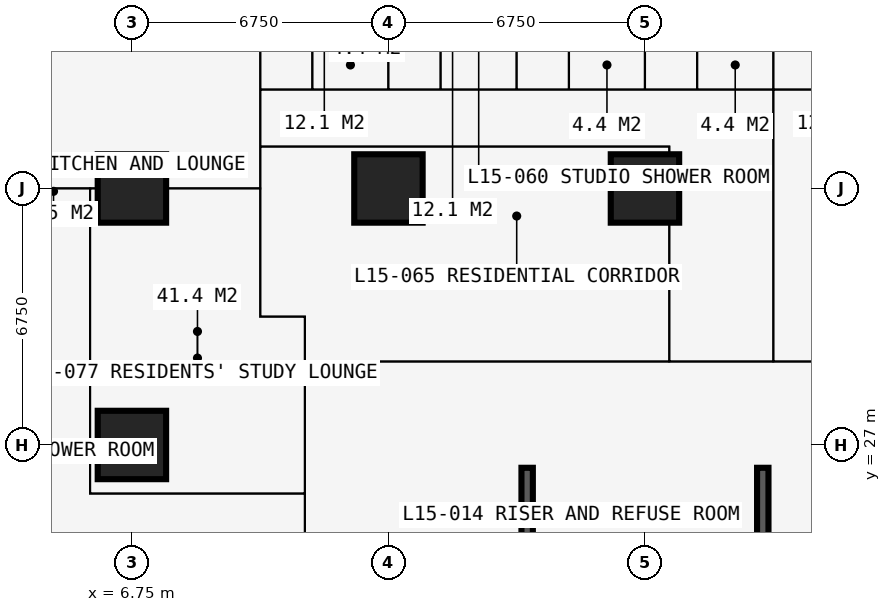
"""IFC4 building model, lengths in metres.
Left out: names, types, materials, properties, quantities, classifications, styles, units other than length and angle.
Written with IfcOpenShell. Run it as: python <this file> out.ifc"""

import sys

from ifc_helpers import new_model, si_unit, direction, frame, frame_2d, origin, origin_2d, place, context, subcontext, project, spatial, rectangle, extrude, element, fill, save


model = new_model("IFC4")
c1 = context("Model", 3, precision=1e-05, world=origin(), true_north=direction((0.0, 1.0)))
c2 = subcontext(c1, "Body", "Model", "MODEL_VIEW")
j1 = project(units=[si_unit("LENGTHUNIT", "METRE"), si_unit("PLANEANGLEUNIT", "RADIAN")], contexts=[c1])
p1 = place(None, origin())
s1 = spatial("IfcSite", under=j1, at=p1, CompositionType="ELEMENT")
p2 = place(p1, origin())
s2 = spatial("IfcBuilding", under=s1, at=p2, CompositionType="ELEMENT")
p3 = place(p2, frame((0.0, 0.0, 57.6)))
s3 = spatial("IfcBuildingStorey", under=s2, at=p3, CompositionType="ELEMENT", Elevation=57.6)
for number, where, z_axis, x_axis in (
    (1, (6.75, 27.0, 0.0), (0.0, 0.0, 1.0), (1.0, 0.0, 0.0)),
    (2, (6.75, 33.75, 0.0), (0.0, 0.0, 1.0), (1.0, 0.0, 0.0)),
    (3, (13.5, 33.75, 0.0), (0.0, 0.0, 1.0), (1.0, 0.0, 0.0)),
    (4, (20.25, 33.75, 0.0), (0.0, 0.0, 1.0), (1.0, 0.0, 0.0)),
):
    element("IfcColumn", number, at=place(p3, frame(where, z_axis=z_axis, x_axis=x_axis)), inside=s3, PredefinedType="COLUMN", context=c2, shape_type="SweptSolid", body=[
        extrude(rectangle(XDim=1.8, YDim=1.8, at=origin_2d()), origin(), (0.0, 0.0, 1.0), 3.6),
    ])
p4 = place(p3, frame((27.6, 27.0, 0.0), z_axis=(0.0, 0.0, 1.0), x_axis=(-1.0, 0.0, 0.0)))
e5 = element("IfcWall", 5, at=p4, inside=s3, PredefinedType="SHEAR", context=c2, shape_type="SweptSolid", body=[
    extrude(rectangle(XDim=14.7, YDim=1.2, at=frame_2d((7.35, 0.0))), origin(), (0.0, 0.0, 1.0), 3.6),
])
p5 = place(p4, frame((5.225, 0.0, 0.0)))
e6 = element("IfcOpeningElement", 6, at=p5, cuts=e5, PredefinedType="OPENING", context=c2, shape_type="SweptSolid", body=[
    extrude(rectangle(XDim=0.9, YDim=2.2, at=frame_2d((0.45, 1.1))), frame((0.0, 0.61, 0.0), z_axis=(0.0, -1.0, 0.0), x_axis=(1.0, 0.0, 0.0)), (0.0, 0.0, 1.0), 1.22),
])
p6 = place(p4, frame((8.2, 0.0, 0.0)))
e7 = element("IfcOpeningElement", 7, at=p6, cuts=e5, PredefinedType="OPENING", context=c2, shape_type="SweptSolid", body=[
    extrude(rectangle(XDim=1.0, YDim=2.2, at=frame_2d((0.5, 1.1))), frame((0.0, 0.61, 0.0), z_axis=(0.0, -1.0, 0.0), x_axis=(1.0, 0.0, 0.0)), (0.0, 0.0, 1.0), 1.22),
])
p7 = place(p3, frame((13.5, 26.4, 0.0), z_axis=(0.0, 0.0, 1.0), x_axis=(0.0, -1.0, 0.0)))
e8 = element("IfcWall", 8, at=p7, inside=s3, PredefinedType="SHEAR", context=c2, shape_type="SweptSolid", body=[
    extrude(rectangle(XDim=12.3, YDim=1.2, at=frame_2d((6.15, 0.0))), origin(), (0.0, 0.0, 1.0), 3.6),
])
p8 = place(p7, frame((7.45, 0.0, 0.0)))
e9 = element("IfcOpeningElement", 9, at=p8, cuts=e8, PredefinedType="OPENING", context=c2, shape_type="SweptSolid", body=[
    extrude(rectangle(XDim=1.2, YDim=2.2, at=frame_2d((0.6, 1.1))), frame((0.0, 0.61, 0.0), z_axis=(0.0, -1.0, 0.0), x_axis=(1.0, 0.0, 0.0)), (0.0, 0.0, 1.0), 1.22),
])
for number, where, z_axis, x_axis in (
    (10, (17.15, 20.3, 0.0), (0.0, 0.0, 1.0), (0.0, 1.0, 0.0)),
    (11, (23.35, 20.3, 0.0), (0.0, 0.0, 1.0), (0.0, 1.0, 0.0)),
):
    element("IfcWall", number, at=place(p3, frame(where, z_axis=z_axis, x_axis=x_axis)), inside=s3, PredefinedType="SHEAR", context=c2, shape_type="SweptSolid", body=[
        extrude(rectangle(XDim=6.1, YDim=0.3, at=frame_2d((3.05, 0.0))), origin(), (0.0, 0.0, 1.0), 3.6),
    ])
p9 = place(p3, frame((19.375, 23.4, 0.0), z_axis=(0.0, 0.0, 1.0), x_axis=(0.0, 1.0, 0.0)))
e12 = element("IfcWall", 12, at=p9, inside=s3, PredefinedType="PARTITIONING", context=c2, shape_type="SweptSolid", body=[
    extrude(rectangle(XDim=3.0, YDim=0.15, at=frame_2d((1.5, 0.0))), origin(), (0.0, 0.0, 1.0), 3.375),
])
p10 = place(p3, frame((4.15, 33.75, 0.0), z_axis=(0.0, 0.0, 1.0), x_axis=(1.0, 0.0, 0.0)))
e13 = element("IfcWall", 13, at=p10, inside=s3, PredefinedType="PARTITIONING", context=c2, shape_type="SweptSolid", body=[
    extrude(rectangle(XDim=5.975, YDim=0.15, at=frame_2d((2.988, 0.0))), origin(), (0.0, 0.0, 1.0), 2.877),
])
p11 = place(p3, frame((5.65, 25.725, 0.0), z_axis=(0.0, 0.0, 1.0), x_axis=(0.0, 1.0, 0.0)))
e14 = element("IfcWall", 14, at=p11, inside=s3, PredefinedType="PARTITIONING", context=c2, shape_type="SweptSolid", body=[
    extrude(rectangle(XDim=8.025, YDim=0.15, at=frame_2d((4.012, 0.0))), origin(), (0.0, 0.0, 1.0), 3.375),
])
p12 = place(p3, frame((5.65, 25.725, 0.0), z_axis=(0.0, 0.0, 1.0), x_axis=(1.0, 0.0, 0.0)))
e15 = element("IfcWall", 15, at=p12, inside=s3, PredefinedType="PARTITIONING", context=c2, shape_type="SweptSolid", body=[
    extrude(rectangle(XDim=5.65, YDim=0.15, at=frame_2d((2.825, 0.0))), origin(), (0.0, 0.0, 1.0), 3.375),
])
p13 = place(p3, frame((10.125, 30.375, 0.0), z_axis=(0.0, 0.0, 1.0), x_axis=(0.0, 1.0, 0.0)))
e16 = element("IfcWall", 16, at=p13, inside=s3, PredefinedType="PARTITIONING", context=c2, shape_type="SweptSolid", body=[
    extrude(rectangle(XDim=10.859, YDim=0.15, at=frame_2d((5.429, 0.0))), origin(), (0.0, 0.0, 1.0), 3.375),
])
p14 = place(p3, frame((10.125, 30.375, 0.0), z_axis=(0.0, 0.0, 1.0), x_axis=(1.0, 0.0, 0.0)))
e17 = element("IfcWall", 17, at=p14, inside=s3, PredefinedType="PARTITIONING", context=c2, shape_type="SweptSolid", body=[
    extrude(rectangle(XDim=1.175, YDim=0.15, at=frame_2d((0.587, 0.0))), origin(), (0.0, 0.0, 1.0), 3.375),
])
p15 = place(p3, frame((10.125, 34.85, 0.0), z_axis=(0.0, 0.0, 1.0), x_axis=(1.0, 0.0, 0.0)))
e18 = element("IfcWall", 18, at=p15, inside=s3, PredefinedType="PARTITIONING", context=c2, shape_type="SweptSolid", body=[
    extrude(rectangle(XDim=10.762, YDim=0.15, at=frame_2d((5.381, 0.0))), origin(), (0.0, 0.0, 1.0), 3.375),
])
p16 = place(p15, frame((4.9, 0.0, 0.0)))
e19 = element("IfcOpeningElement", 19, at=p16, cuts=e18, PredefinedType="OPENING", context=c2, shape_type="SweptSolid", body=[
    extrude(rectangle(XDim=0.95, YDim=2.2, at=frame_2d((0.475, 1.1))), frame((0.0, 0.085, 0.0), z_axis=(0.0, -1.0, 0.0), x_axis=(1.0, 0.0, 0.0)), (0.0, 0.0, 1.0), 0.17),
])
p17 = place(p3, frame((10.125, 36.35, 0.0), z_axis=(0.0, 0.0, 1.0), x_axis=(1.0, 0.0, 0.0)))
e20 = element("IfcWall", 20, at=p17, inside=s3, PredefinedType="PARTITIONING", context=c2, shape_type="SweptSolid", body=[
    extrude(rectangle(XDim=23.625, YDim=0.1, at=frame_2d((11.812, 0.0))), origin(), (0.0, 0.0, 1.0), 3.375),
])
p18 = place(p17, frame((20.5, 0.0, 0.0)))
e21 = element("IfcOpeningElement", 21, at=p18, cuts=e20, PredefinedType="OPENING", context=c2, shape_type="SweptSolid", body=[
    extrude(rectangle(XDim=0.95, YDim=2.2, at=frame_2d((0.475, 1.1))), frame((0.0, 0.06, 0.0), z_axis=(0.0, -1.0, 0.0), x_axis=(1.0, 0.0, 0.0)), (0.0, 0.0, 1.0), 0.12),
])
p19 = place(p17, frame((17.125, 0.0, 0.0)))
e22 = element("IfcOpeningElement", 22, at=p19, cuts=e20, PredefinedType="OPENING", context=c2, shape_type="SweptSolid", body=[
    extrude(rectangle(XDim=0.95, YDim=2.2, at=frame_2d((0.475, 1.1))), frame((0.0, 0.06, 0.0), z_axis=(0.0, -1.0, 0.0), x_axis=(1.0, 0.0, 0.0)), (0.0, 0.0, 1.0), 0.12),
])
p20 = place(p17, frame((13.7, 0.0, 0.0)))
e23 = element("IfcOpeningElement", 23, at=p20, cuts=e20, PredefinedType="OPENING", context=c2, shape_type="SweptSolid", body=[
    extrude(rectangle(XDim=0.95, YDim=2.2, at=frame_2d((0.475, 1.1))), frame((0.0, 0.06, 0.0), z_axis=(0.0, -1.0, 0.0), x_axis=(1.0, 0.0, 0.0)), (0.0, 0.0, 1.0), 0.12),
])
p21 = place(p17, frame((0.2, 0.0, 0.0)))
e24 = element("IfcOpeningElement", 24, at=p21, cuts=e20, PredefinedType="OPENING", context=c2, shape_type="SweptSolid", body=[
    extrude(rectangle(XDim=0.95, YDim=2.2, at=frame_2d((0.475, 1.1))), frame((0.0, 0.06, 0.0), z_axis=(0.0, -1.0, 0.0), x_axis=(1.0, 0.0, 0.0)), (0.0, 0.0, 1.0), 0.12),
])
p22 = place(p17, frame((3.625, 0.0, 0.0)))
e25 = element("IfcOpeningElement", 25, at=p22, cuts=e20, PredefinedType="OPENING", context=c2, shape_type="SweptSolid", body=[
    extrude(rectangle(XDim=0.95, YDim=2.2, at=frame_2d((0.475, 1.1))), frame((0.0, 0.06, 0.0), z_axis=(0.0, -1.0, 0.0), x_axis=(1.0, 0.0, 0.0)), (0.0, 0.0, 1.0), 0.12),
])
p23 = place(p17, frame((7.0, 0.0, 0.0)))
e26 = element("IfcOpeningElement", 26, at=p23, cuts=e20, PredefinedType="OPENING", context=c2, shape_type="SweptSolid", body=[
    extrude(rectangle(XDim=0.95, YDim=2.2, at=frame_2d((0.475, 1.1))), frame((0.0, 0.06, 0.0), z_axis=(0.0, -1.0, 0.0), x_axis=(1.0, 0.0, 0.0)), (0.0, 0.0, 1.0), 0.12),
])
p24 = place(p17, frame((10.375, 0.0, 0.0)))
e27 = element("IfcOpeningElement", 27, at=p24, cuts=e20, PredefinedType="OPENING", context=c2, shape_type="SweptSolid", body=[
    extrude(rectangle(XDim=0.95, YDim=2.2, at=frame_2d((0.475, 1.1))), frame((0.0, 0.06, 0.0), z_axis=(0.0, -1.0, 0.0), x_axis=(1.0, 0.0, 0.0)), (0.0, 0.0, 1.0), 0.12),
])
p25 = place(p3, frame((11.3, 11.3, 0.0), z_axis=(0.0, 0.0, 1.0), x_axis=(0.0, 1.0, 0.0)))
e28 = element("IfcWall", 28, at=p25, inside=s3, PredefinedType="PARTITIONING", context=c2, shape_type="SweptSolid", body=[
    extrude(rectangle(XDim=19.075, YDim=0.15, at=frame_2d((9.538, 0.0))), origin(), (0.0, 0.0, 1.0), 3.375),
])
p26 = place(p25, frame((12.875, 0.0, 0.0)))
e29 = element("IfcOpeningElement", 29, at=p26, cuts=e28, PredefinedType="OPENING", context=c2, shape_type="SweptSolid", body=[
    extrude(rectangle(XDim=1.0, YDim=2.2, at=frame_2d((0.5, 1.1))), frame((0.0, 0.085, 0.0), z_axis=(0.0, -1.0, 0.0), x_axis=(1.0, 0.0, 0.0)), (0.0, 0.0, 1.0), 0.17),
])
p27 = place(p25, frame((10.438, 0.0, 0.0)))
e30 = element("IfcOpeningElement", 30, at=p27, cuts=e28, PredefinedType="OPENING", context=c2, shape_type="SweptSolid", body=[
    extrude(rectangle(XDim=1.0, YDim=2.2, at=frame_2d((0.5, 1.1))), frame((0.0, 0.085, 0.0), z_axis=(0.0, -1.0, 0.0), x_axis=(1.0, 0.0, 0.0)), (0.0, 0.0, 1.0), 0.17),
])
p28 = place(p25, frame((15.675, 0.0, 0.0)))
e31 = element("IfcOpeningElement", 31, at=p28, cuts=e28, PredefinedType="OPENING", context=c2, shape_type="SweptSolid", body=[
    extrude(rectangle(XDim=0.95, YDim=2.2, at=frame_2d((0.475, 1.1))), frame((0.0, 0.085, 0.0), z_axis=(0.0, -1.0, 0.0), x_axis=(1.0, 0.0, 0.0)), (0.0, 0.0, 1.0), 0.17),
])
p29 = place(p3, frame((11.3, 29.2, 0.0), z_axis=(0.0, 0.0, 1.0), x_axis=(1.0, 0.0, 0.0)))
e32 = element("IfcWall", 32, at=p29, inside=s3, PredefinedType="PARTITIONING", context=c2, shape_type="SweptSolid", body=[
    extrude(rectangle(XDim=19.075, YDim=0.15, at=frame_2d((9.538, 0.0))), origin(), (0.0, 0.0, 1.0), 3.375),
])
p30 = place(p29, frame((12.875, 0.0, 0.0)))
e33 = element("IfcOpeningElement", 33, at=p30, cuts=e32, PredefinedType="OPENING", context=c2, shape_type="SweptSolid", body=[
    extrude(rectangle(XDim=1.0, YDim=2.2, at=frame_2d((0.5, 1.1))), frame((0.0, 0.085, 0.0), z_axis=(0.0, -1.0, 0.0), x_axis=(1.0, 0.0, 0.0)), (0.0, 0.0, 1.0), 0.17),
])
p31 = place(p29, frame((10.438, 0.0, 0.0)))
e34 = element("IfcOpeningElement", 34, at=p31, cuts=e32, PredefinedType="OPENING", context=c2, shape_type="SweptSolid", body=[
    extrude(rectangle(XDim=1.0, YDim=2.2, at=frame_2d((0.5, 1.1))), frame((0.0, 0.085, 0.0), z_axis=(0.0, -1.0, 0.0), x_axis=(1.0, 0.0, 0.0)), (0.0, 0.0, 1.0), 0.17),
])
p32 = place(p29, frame((15.675, 0.0, 0.0)))
e35 = element("IfcOpeningElement", 35, at=p32, cuts=e32, PredefinedType="OPENING", context=c2, shape_type="SweptSolid", body=[
    extrude(rectangle(XDim=0.95, YDim=2.2, at=frame_2d((0.475, 1.1))), frame((0.0, 0.085, 0.0), z_axis=(0.0, -1.0, 0.0), x_axis=(1.0, 0.0, 0.0)), (0.0, 0.0, 1.0), 0.17),
])
p33 = place(p3, frame((11.5, 36.35, 0.0), z_axis=(0.0, 0.0, 1.0), x_axis=(0.0, 1.0, 0.0)))
e36 = element("IfcWall", 36, at=p33, inside=s3, PredefinedType="PARTITIONING", context=c2, shape_type="SweptSolid", body=[
    extrude(rectangle(XDim=2.2, YDim=0.1, at=frame_2d((1.1, 0.0))), origin(), (0.0, 0.0, 1.0), 3.375),
])
p34 = place(p33, frame((0.65, 0.0, 0.0)))
e37 = element("IfcOpeningElement", 37, at=p34, cuts=e36, PredefinedType="OPENING", context=c2, shape_type="SweptSolid", body=[
    extrude(rectangle(XDim=0.9, YDim=2.2, at=frame_2d((0.45, 1.1))), frame((0.0, 0.06, 0.0), z_axis=(0.0, -1.0, 0.0), x_axis=(1.0, 0.0, 0.0)), (0.0, 0.0, 1.0), 0.12),
])
p35 = place(p3, frame((13.5, 36.35, 0.0), z_axis=(0.0, 0.0, 1.0), x_axis=(0.0, 1.0, 0.0)))
e38 = element("IfcWall", 38, at=p35, inside=s3, PredefinedType="PARTITIONING", context=c2, shape_type="SweptSolid", body=[
    extrude(rectangle(XDim=4.884, YDim=0.175, at=frame_2d((2.442, 0.0))), origin(), (0.0, 0.0, 1.0), 2.61),
])
p36 = place(p3, frame((14.875, 36.35, 0.0), z_axis=(0.0, 0.0, 1.0), x_axis=(0.0, 1.0, 0.0)))
e39 = element("IfcWall", 39, at=p36, inside=s3, PredefinedType="PARTITIONING", context=c2, shape_type="SweptSolid", body=[
    extrude(rectangle(XDim=2.2, YDim=0.1, at=frame_2d((1.1, 0.0))), origin(), (0.0, 0.0, 1.0), 3.375),
])
p37 = place(p36, frame((0.65, 0.0, 0.0)))
e40 = element("IfcOpeningElement", 40, at=p37, cuts=e39, PredefinedType="OPENING", context=c2, shape_type="SweptSolid", body=[
    extrude(rectangle(XDim=0.9, YDim=2.2, at=frame_2d((0.45, 1.1))), frame((0.0, 0.06, 0.0), z_axis=(0.0, -1.0, 0.0), x_axis=(1.0, 0.0, 0.0)), (0.0, 0.0, 1.0), 0.12),
])
p38 = place(p3, frame((16.875, 36.35, 0.0), z_axis=(0.0, 0.0, 1.0), x_axis=(0.0, 1.0, 0.0)))
e41 = element("IfcWall", 41, at=p38, inside=s3, PredefinedType="PARTITIONING", context=c2, shape_type="SweptSolid", body=[
    extrude(rectangle(XDim=4.884, YDim=0.175, at=frame_2d((2.442, 0.0))), origin(), (0.0, 0.0, 1.0), 3.375),
])
p39 = place(p3, frame((18.25, 36.35, 0.0), z_axis=(0.0, 0.0, 1.0), x_axis=(0.0, 1.0, 0.0)))
e42 = element("IfcWall", 42, at=p39, inside=s3, PredefinedType="PARTITIONING", context=c2, shape_type="SweptSolid", body=[
    extrude(rectangle(XDim=2.2, YDim=0.1, at=frame_2d((1.1, 0.0))), origin(), (0.0, 0.0, 1.0), 3.375),
])
p40 = place(p39, frame((0.65, 0.0, 0.0)))
e43 = element("IfcOpeningElement", 43, at=p40, cuts=e42, PredefinedType="OPENING", context=c2, shape_type="SweptSolid", body=[
    extrude(rectangle(XDim=0.9, YDim=2.2, at=frame_2d((0.45, 1.1))), frame((0.0, 0.06, 0.0), z_axis=(0.0, -1.0, 0.0), x_axis=(1.0, 0.0, 0.0)), (0.0, 0.0, 1.0), 0.12),
])
p41 = place(p3, frame((20.25, 36.35, 0.0), z_axis=(0.0, 0.0, 1.0), x_axis=(0.0, 1.0, 0.0)))
e44 = element("IfcWall", 44, at=p41, inside=s3, PredefinedType="PARTITIONING", context=c2, shape_type="SweptSolid", body=[
    extrude(rectangle(XDim=4.884, YDim=0.175, at=frame_2d((2.442, 0.0))), origin(), (0.0, 0.0, 1.0), 2.61),
])
p42 = place(p3, frame((20.887, 29.2, 0.0), z_axis=(0.0, 0.0, 1.0), x_axis=(0.0, 1.0, 0.0)))
e45 = element("IfcWall", 45, at=p42, inside=s3, PredefinedType="PARTITIONING", context=c2, shape_type="SweptSolid", body=[
    extrude(rectangle(XDim=5.65, YDim=0.15, at=frame_2d((2.825, 0.0))), origin(), (0.0, 0.0, 1.0), 3.375),
])
p43 = place(p3, frame((21.625, 36.35, 0.0), z_axis=(0.0, 0.0, 1.0), x_axis=(0.0, 1.0, 0.0)))
e46 = element("IfcWall", 46, at=p43, inside=s3, PredefinedType="PARTITIONING", context=c2, shape_type="SweptSolid", body=[
    extrude(rectangle(XDim=2.2, YDim=0.1, at=frame_2d((1.1, 0.0))), origin(), (0.0, 0.0, 1.0), 3.375),
])
p44 = place(p43, frame((0.65, 0.0, 0.0)))
e47 = element("IfcOpeningElement", 47, at=p44, cuts=e46, PredefinedType="OPENING", context=c2, shape_type="SweptSolid", body=[
    extrude(rectangle(XDim=0.9, YDim=2.2, at=frame_2d((0.45, 1.1))), frame((0.0, 0.06, 0.0), z_axis=(0.0, -1.0, 0.0), x_axis=(1.0, 0.0, 0.0)), (0.0, 0.0, 1.0), 0.12),
])
p45 = place(p3, frame((23.625, 29.2, 0.0), z_axis=(0.0, 0.0, 1.0), x_axis=(0.0, 1.0, 0.0)))
e48 = element("IfcWall", 48, at=p45, inside=s3, PredefinedType="PARTITIONING", context=c2, shape_type="SweptSolid", body=[
    extrude(rectangle(XDim=12.034, YDim=0.15, at=frame_2d((6.017, 0.0))), origin(), (0.0, 0.0, 1.0), 3.375),
])
p46 = place(p5, origin())
e49 = element("IfcDoor", 49, at=p46, inside=s3, OperationType="SINGLE_SWING_LEFT", PredefinedType="DOOR", context=c2, shape_type="SweptSolid", body=[
    extrude(rectangle(XDim=0.9, YDim=2.2, at=frame_2d((0.45, 1.1))), frame((0.0, 0.4, 0.0), z_axis=(0.0, -1.0, 0.0), x_axis=(1.0, 0.0, 0.0)), (0.0, 0.0, 1.0), 0.8),
])
fill(e6, e49)
p47 = place(p6, origin())
e50 = element("IfcDoor", 50, at=p47, inside=s3, OperationType="SINGLE_SWING_LEFT", PredefinedType="DOOR", context=c2, shape_type="SweptSolid", body=[
    extrude(rectangle(XDim=1.0, YDim=2.2, at=frame_2d((0.5, 1.1))), frame((0.0, 0.025, 0.0), z_axis=(0.0, -1.0, 0.0), x_axis=(1.0, 0.0, 0.0)), (0.0, 0.0, 1.0), 0.05),
])
fill(e7, e50)
p48 = place(p20, origin())
e51 = element("IfcDoor", 51, at=p48, inside=s3, OperationType="SINGLE_SWING_LEFT", PredefinedType="DOOR", context=c2, shape_type="SweptSolid", body=[
    extrude(rectangle(XDim=0.95, YDim=2.2, at=frame_2d((0.475, 1.1))), frame((0.0, 0.025, 0.0), z_axis=(0.0, -1.0, 0.0), x_axis=(1.0, 0.0, 0.0)), (0.0, 0.0, 1.0), 0.05),
])
fill(e23, e51)
p49 = place(p30, origin())
e52 = element("IfcDoor", 52, at=p49, inside=s3, OperationType="SINGLE_SWING_LEFT", PredefinedType="DOOR", context=c2, shape_type="SweptSolid", body=[
    extrude(rectangle(XDim=1.0, YDim=2.2, at=frame_2d((0.5, 1.1))), frame((0.0, 0.025, 0.0), z_axis=(0.0, -1.0, 0.0), x_axis=(1.0, 0.0, 0.0)), (0.0, 0.0, 1.0), 0.05),
])
fill(e33, e52)
p50 = place(p21, origin())
e53 = element("IfcDoor", 53, at=p50, inside=s3, OperationType="SINGLE_SWING_LEFT", PredefinedType="DOOR", context=c2, shape_type="SweptSolid", body=[
    extrude(rectangle(XDim=0.95, YDim=2.2, at=frame_2d((0.475, 1.1))), frame((0.0, 0.025, 0.0), z_axis=(0.0, -1.0, 0.0), x_axis=(1.0, 0.0, 0.0)), (0.0, 0.0, 1.0), 0.05),
])
fill(e24, e53)
p51 = place(p34, origin())
e54 = element("IfcDoor", 54, at=p51, inside=s3, OperationType="SINGLE_SWING_RIGHT", PredefinedType="DOOR", context=c2, shape_type="SweptSolid", body=[
    extrude(rectangle(XDim=0.9, YDim=2.2, at=frame_2d((0.45, 1.1))), frame((0.0, 0.025, 0.0), z_axis=(0.0, -1.0, 0.0), x_axis=(1.0, 0.0, 0.0)), (0.0, 0.0, 1.0), 0.05),
])
fill(e37, e54)
p52 = place(p22, origin())
e55 = element("IfcDoor", 55, at=p52, inside=s3, OperationType="SINGLE_SWING_LEFT", PredefinedType="DOOR", context=c2, shape_type="SweptSolid", body=[
    extrude(rectangle(XDim=0.95, YDim=2.2, at=frame_2d((0.475, 1.1))), frame((0.0, 0.025, 0.0), z_axis=(0.0, -1.0, 0.0), x_axis=(1.0, 0.0, 0.0)), (0.0, 0.0, 1.0), 0.05),
])
fill(e25, e55)
p53 = place(p37, origin())
e56 = element("IfcDoor", 56, at=p53, inside=s3, OperationType="SINGLE_SWING_RIGHT", PredefinedType="DOOR", context=c2, shape_type="SweptSolid", body=[
    extrude(rectangle(XDim=0.9, YDim=2.2, at=frame_2d((0.45, 1.1))), frame((0.0, 0.025, 0.0), z_axis=(0.0, -1.0, 0.0), x_axis=(1.0, 0.0, 0.0)), (0.0, 0.0, 1.0), 0.05),
])
fill(e40, e56)
p54 = place(p23, origin())
e57 = element("IfcDoor", 57, at=p54, inside=s3, OperationType="SINGLE_SWING_LEFT", PredefinedType="DOOR", context=c2, shape_type="SweptSolid", body=[
    extrude(rectangle(XDim=0.95, YDim=2.2, at=frame_2d((0.475, 1.1))), frame((0.0, 0.025, 0.0), z_axis=(0.0, -1.0, 0.0), x_axis=(1.0, 0.0, 0.0)), (0.0, 0.0, 1.0), 0.05),
])
fill(e26, e57)
p55 = place(p40, origin())
e58 = element("IfcDoor", 58, at=p55, inside=s3, OperationType="SINGLE_SWING_RIGHT", PredefinedType="DOOR", context=c2, shape_type="SweptSolid", body=[
    extrude(rectangle(XDim=0.9, YDim=2.2, at=frame_2d((0.45, 1.1))), frame((0.0, 0.025, 0.0), z_axis=(0.0, -1.0, 0.0), x_axis=(1.0, 0.0, 0.0)), (0.0, 0.0, 1.0), 0.05),
])
fill(e43, e58)
p56 = place(p24, origin())
e59 = element("IfcDoor", 59, at=p56, inside=s3, OperationType="SINGLE_SWING_LEFT", PredefinedType="DOOR", context=c2, shape_type="SweptSolid", body=[
    extrude(rectangle(XDim=0.95, YDim=2.2, at=frame_2d((0.475, 1.1))), frame((0.0, 0.025, 0.0), z_axis=(0.0, -1.0, 0.0), x_axis=(1.0, 0.0, 0.0)), (0.0, 0.0, 1.0), 0.05),
])
fill(e27, e59)
p57 = place(p44, origin())
e60 = element("IfcDoor", 60, at=p57, inside=s3, OperationType="SINGLE_SWING_RIGHT", PredefinedType="DOOR", context=c2, shape_type="SweptSolid", body=[
    extrude(rectangle(XDim=0.9, YDim=2.2, at=frame_2d((0.45, 1.1))), frame((0.0, 0.025, 0.0), z_axis=(0.0, -1.0, 0.0), x_axis=(1.0, 0.0, 0.0)), (0.0, 0.0, 1.0), 0.05),
])
fill(e47, e60)
p58 = place(p31, origin())
e61 = element("IfcDoor", 61, at=p58, inside=s3, OperationType="SINGLE_SWING_LEFT", PredefinedType="DOOR", context=c2, shape_type="SweptSolid", body=[
    extrude(rectangle(XDim=1.0, YDim=2.2, at=frame_2d((0.5, 1.1))), frame((0.0, 0.025, 0.0), z_axis=(0.0, -1.0, 0.0), x_axis=(1.0, 0.0, 0.0)), (0.0, 0.0, 1.0), 0.05),
])
fill(e34, e61)
p59 = place(p16, origin())
e62 = element("IfcDoor", 62, at=p59, inside=s3, OperationType="SINGLE_SWING_LEFT", PredefinedType="DOOR", context=c2, shape_type="SweptSolid", body=[
    extrude(rectangle(XDim=0.95, YDim=2.2, at=frame_2d((0.475, 1.1))), frame((0.0, 0.025, 0.0), z_axis=(0.0, -1.0, 0.0), x_axis=(1.0, 0.0, 0.0)), (0.0, 0.0, 1.0), 0.05),
])
fill(e19, e62)
p60 = place(p26, origin())
e63 = element("IfcDoor", 63, at=p60, inside=s3, OperationType="SINGLE_SWING_LEFT", PredefinedType="DOOR", context=c2, shape_type="SweptSolid", body=[
    extrude(rectangle(XDim=1.0, YDim=2.2, at=frame_2d((0.5, 1.1))), frame((0.0, 0.025, 0.0), z_axis=(0.0, -1.0, 0.0), x_axis=(1.0, 0.0, 0.0)), (0.0, 0.0, 1.0), 0.05),
])
fill(e29, e63)
p61 = place(p28, origin())
e64 = element("IfcDoor", 64, at=p61, inside=s3, OperationType="SINGLE_SWING_LEFT", PredefinedType="DOOR", context=c2, shape_type="SweptSolid", body=[
    extrude(rectangle(XDim=0.95, YDim=2.2, at=frame_2d((0.475, 1.1))), frame((0.0, 0.025, 0.0), z_axis=(0.0, -1.0, 0.0), x_axis=(1.0, 0.0, 0.0)), (0.0, 0.0, 1.0), 0.05),
])
fill(e31, e64)
save(model, sys.argv[1])
